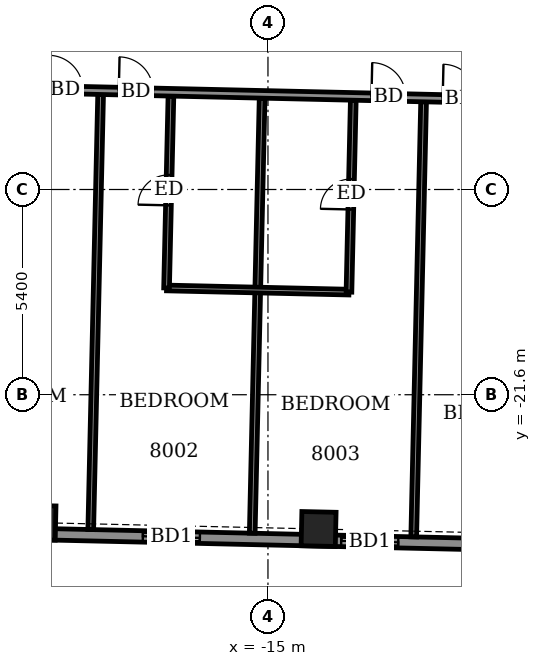
"""IFC4 building model, lengths in metres.
Left out: names, types, materials, properties, quantities, classifications, styles, units other than length and angle.
Written with IfcOpenShell. Run it as: python <this file> out.ifc"""

import sys

from ifc_helpers import new_model, si_unit, direction, frame, frame_2d, origin, origin_2d, place, context, subcontext, project, spatial, rectangle, extrude, element, fill, save


model = new_model("IFC4")
c1 = context("Model", 3, precision=1e-05, world=origin(), true_north=direction((0.0, 1.0)))
c2 = subcontext(c1, "Body", "Model", "MODEL_VIEW")
j1 = project(units=[si_unit("LENGTHUNIT", "METRE"), si_unit("PLANEANGLEUNIT", "RADIAN")], contexts=[c1])
p1 = place(None, origin())
s1 = spatial("IfcSite", under=j1, at=p1, CompositionType="ELEMENT")
p2 = place(p1, origin())
s2 = spatial("IfcBuilding", under=s1, at=p2, CompositionType="ELEMENT")
p3 = place(p2, frame((0.0, 0.0, 313.3)))
s3 = spatial("IfcBuildingStorey", under=s2, at=p3, CompositionType="ELEMENT", Elevation=313.3)
for number, where, z_axis, x_axis in (
    (1, (-21.038, -24.966, -0.55), (0.0, 0.0, 1.0), (1.0, -0.023, 0.0)),
    (2, (-13.668, -25.133, -0.55), (0.0, 0.0, 1.0), (1.0, -0.023, 0.0)),
):
    element("IfcColumn", number, at=place(p3, frame(where, z_axis=z_axis, x_axis=x_axis)), inside=s3, PredefinedType="COLUMN", context=c2, shape_type="SweptSolid", body=[
        extrude(rectangle(XDim=0.9, YDim=0.9, at=origin_2d()), origin(), (0.0, 0.0, 1.0), 3.6),
    ])
p4 = place(p3, frame((-28.264, -25.102, 0.0), z_axis=(0.0, 0.0, 1.0), x_axis=(0.999742520573, -0.022691244094, 0.0)))
e3 = element("IfcWall", 3, at=p4, inside=s3, PredefinedType="SOLIDWALL", context=c2, shape_type="SweptSolid", body=[
    extrude(rectangle(XDim=51.3, YDim=0.3, at=frame_2d((25.65, 0.0))), origin(), (0.0, 0.0, 1.0), 2.5),
])
p5 = place(p4, frame((1.654, 0.0, 0.0)))
e4 = element("IfcOpeningElement", 4, at=p5, cuts=e3, PredefinedType="OPENING", context=c2, shape_type="SweptSolid", body=[
    extrude(rectangle(XDim=1.5, YDim=2.4, at=frame_2d((0.75, 1.2))), frame((0.0, 0.16, 0.0), z_axis=(0.0, -1.0, 0.0), x_axis=(1.0, 0.0, 0.0)), (0.0, 0.0, 1.0), 0.32),
])
p6 = place(p4, frame((4.936, 0.0, 0.0)))
e5 = element("IfcOpeningElement", 5, at=p6, cuts=e3, PredefinedType="OPENING", context=c2, shape_type="SweptSolid", body=[
    extrude(rectangle(XDim=1.5, YDim=2.4, at=frame_2d((0.75, 1.2))), frame((0.0, 0.16, 0.0), z_axis=(0.0, -1.0, 0.0), x_axis=(1.0, 0.0, 0.0)), (0.0, 0.0, 1.0), 0.32),
])
p7 = place(p4, frame((9.975, 0.0, 0.0)))
e6 = element("IfcOpeningElement", 6, at=p7, cuts=e3, PredefinedType="OPENING", context=c2, shape_type="SweptSolid", body=[
    extrude(rectangle(XDim=1.5, YDim=2.4, at=frame_2d((0.75, 1.2))), frame((0.0, 0.16, 0.0), z_axis=(0.0, -1.0, 0.0), x_axis=(1.0, 0.0, 0.0)), (0.0, 0.0, 1.0), 0.32),
])
p8 = place(p4, frame((15.196, 0.0, 0.0)))
e7 = element("IfcOpeningElement", 7, at=p8, cuts=e3, PredefinedType="OPENING", context=c2, shape_type="SweptSolid", body=[
    extrude(rectangle(XDim=1.5, YDim=2.4, at=frame_2d((0.75, 1.2))), frame((0.0, 0.16, 0.0), z_axis=(0.0, -1.0, 0.0), x_axis=(1.0, 0.0, 0.0)), (0.0, 0.0, 1.0), 0.32),
])
p9 = place(p4, frame((18.5, 0.0, 0.0)))
e8 = element("IfcOpeningElement", 8, at=p9, cuts=e3, PredefinedType="OPENING", context=c2, shape_type="SweptSolid", body=[
    extrude(rectangle(XDim=1.5, YDim=2.4, at=frame_2d((0.75, 1.2))), frame((0.0, 0.16, 0.0), z_axis=(0.0, -1.0, 0.0), x_axis=(1.0, 0.0, 0.0)), (0.0, 0.0, 1.0), 0.32),
])
p10 = place(p4, frame((23.157, 0.0, 0.0)))
e9 = element("IfcOpeningElement", 9, at=p10, cuts=e3, PredefinedType="OPENING", context=c2, shape_type="SweptSolid", body=[
    extrude(rectangle(XDim=1.5, YDim=2.4, at=frame_2d((0.75, 1.2))), frame((0.0, 0.16, 0.0), z_axis=(0.0, -1.0, 0.0), x_axis=(1.0, 0.0, 0.0)), (0.0, 0.0, 1.0), 0.32),
])
p11 = place(p4, frame((26.643, 0.0, 0.0)))
e10 = element("IfcOpeningElement", 10, at=p11, cuts=e3, PredefinedType="OPENING", context=c2, shape_type="SweptSolid", body=[
    extrude(rectangle(XDim=1.5, YDim=2.4, at=frame_2d((0.75, 1.2))), frame((0.0, 0.16, 0.0), z_axis=(0.0, -1.0, 0.0), x_axis=(1.0, 0.0, 0.0)), (0.0, 0.0, 1.0), 0.32),
])
p12 = place(p4, frame((31.275, 0.0, 0.0)))
e11 = element("IfcOpeningElement", 11, at=p12, cuts=e3, PredefinedType="OPENING", context=c2, shape_type="SweptSolid", body=[
    extrude(rectangle(XDim=1.5, YDim=2.4, at=frame_2d((0.75, 1.2))), frame((0.0, 0.16, 0.0), z_axis=(0.0, -1.0, 0.0), x_axis=(1.0, 0.0, 0.0)), (0.0, 0.0, 1.0), 0.32),
])
p13 = place(p4, frame((34.578, 0.0, 0.0)))
e12 = element("IfcOpeningElement", 12, at=p13, cuts=e3, PredefinedType="OPENING", context=c2, shape_type="SweptSolid", body=[
    extrude(rectangle(XDim=1.5, YDim=2.4, at=frame_2d((0.75, 1.2))), frame((0.0, 0.16, 0.0), z_axis=(0.0, -1.0, 0.0), x_axis=(1.0, 0.0, 0.0)), (0.0, 0.0, 1.0), 0.32),
])
p14 = place(p4, frame((39.75, 0.0, 0.0)))
e13 = element("IfcOpeningElement", 13, at=p14, cuts=e3, PredefinedType="OPENING", context=c2, shape_type="SweptSolid", body=[
    extrude(rectangle(XDim=1.5, YDim=2.4, at=frame_2d((0.75, 1.2))), frame((0.0, 0.16, 0.0), z_axis=(0.0, -1.0, 0.0), x_axis=(1.0, 0.0, 0.0)), (0.0, 0.0, 1.0), 0.32),
])
p15 = place(p4, frame((44.839, 0.0, 0.0)))
e14 = element("IfcOpeningElement", 14, at=p15, cuts=e3, PredefinedType="OPENING", context=c2, shape_type="SweptSolid", body=[
    extrude(rectangle(XDim=1.5, YDim=2.4, at=frame_2d((0.75, 1.2))), frame((0.0, 0.16, 0.0), z_axis=(0.0, -1.0, 0.0), x_axis=(1.0, 0.0, 0.0)), (0.0, 0.0, 1.0), 0.32),
])
p16 = place(p4, frame((47.628, 0.0, 0.9)))
e15 = element("IfcOpeningElement", 15, at=p16, cuts=e3, PredefinedType="OPENING", context=c2, shape_type="SweptSolid", body=[
    extrude(rectangle(XDim=2.4, YDim=1.5, at=frame_2d((1.2, 0.75))), frame((0.0, 0.16, 0.0), z_axis=(0.0, -1.0, 0.0), x_axis=(1.0, 0.0, 0.0)), (0.0, 0.0, 1.0), 0.32),
])
p17 = place(p3, frame((-19.663, -25.147, 0.0), z_axis=(0.0, 0.0, 1.0), x_axis=(0.022708327922, 0.999742132674, 0.0)))
e16 = element("IfcWall", 16, at=p17, inside=s3, PredefinedType="PARTITIONING", context=c2, shape_type="SweptSolid", body=[
    extrude(rectangle(XDim=11.45, YDim=0.15, at=frame_2d((5.725, 0.0))), origin(), (0.0, 0.0, 1.0), 2.5),
])
p18 = place(p3, frame((-15.414, -25.244, 0.0), z_axis=(0.0, 0.0, 1.0), x_axis=(0.022706391805, 0.999742176649, 0.0)))
e17 = element("IfcWall", 17, at=p18, inside=s3, PredefinedType="PARTITIONING", context=c2, shape_type="SweptSolid", body=[
    extrude(rectangle(XDim=11.451, YDim=0.15, at=frame_2d((5.726, 0.0))), origin(), (0.0, 0.0, 1.0), 2.5),
])
p19 = place(p3, frame((-11.165, -25.34, 0.0), z_axis=(0.0, 0.0, 1.0), x_axis=(0.022708327922, 0.999742132674, 0.0)))
e18 = element("IfcWall", 18, at=p19, inside=s3, PredefinedType="PARTITIONING", context=c2, shape_type="SweptSolid", body=[
    extrude(rectangle(XDim=11.45, YDim=0.15, at=frame_2d((5.725, 0.0))), origin(), (0.0, 0.0, 1.0), 2.5),
])
p20 = place(p3, frame((-17.668, -18.791, 0.0), z_axis=(0.0, 0.0, 1.0), x_axis=(0.999742701292, -0.022683280499, 0.0)))
e19 = element("IfcWall", 19, at=p20, inside=s3, PredefinedType="PARTITIONING", context=c2, shape_type="SweptSolid", body=[
    extrude(rectangle(XDim=4.8, YDim=0.15, at=frame_2d((2.4, 0.0))), origin(), (0.0, 0.0, 1.0), 3.05),
])
p21 = place(p3, frame((-17.668, -18.791, 0.0), z_axis=(0.0, 0.0, 1.0), x_axis=(0.022768623305, 0.999740761294, 0.0)))
e20 = element("IfcWall", 20, at=p21, inside=s3, PredefinedType="PARTITIONING", context=c2, shape_type="SweptSolid", body=[
    extrude(rectangle(XDim=5.05, YDim=0.15, at=frame_2d((2.525, 0.0))), origin(), (0.0, 0.0, 1.0), 3.05),
])
p22 = place(p21, frame((2.175, 0.0, 0.0)))
e21 = element("IfcOpeningElement", 21, at=p22, cuts=e20, PredefinedType="OPENING", context=c2, shape_type="SweptSolid", body=[
    extrude(rectangle(XDim=0.8, YDim=2.1, at=frame_2d((0.4, 1.05))), frame((0.0, 0.085, 0.0), z_axis=(0.0, -1.0, 0.0), x_axis=(1.0, 0.0, 0.0)), (0.0, 0.0, 1.0), 0.17),
])
p23 = place(p3, frame((-12.869, -18.9, 0.0), z_axis=(0.0, 0.0, 1.0), x_axis=(0.022576449265, 0.999745119487, 0.0)))
e22 = element("IfcWall", 22, at=p23, inside=s3, PredefinedType="PARTITIONING", context=c2, shape_type="SweptSolid", body=[
    extrude(rectangle(XDim=5.05, YDim=0.15, at=frame_2d((2.525, 0.0))), origin(), (0.0, 0.0, 1.0), 3.05),
])
p24 = place(p23, frame((2.175, 0.0, 0.0)))
e23 = element("IfcOpeningElement", 23, at=p24, cuts=e22, PredefinedType="OPENING", context=c2, shape_type="SweptSolid", body=[
    extrude(rectangle(XDim=0.8, YDim=2.1, at=frame_2d((0.4, 1.05))), frame((0.0, 0.085, 0.0), z_axis=(0.0, -1.0, 0.0), x_axis=(1.0, 0.0, 0.0)), (0.0, 0.0, 1.0), 0.17),
])
p25 = place(p3, frame((-31.347, -13.329, 0.0), z_axis=(0.0, 0.0, 1.0), x_axis=(0.999742613079, -0.022687168058, 0.0)))
e24 = element("IfcWall", 24, at=p25, inside=s3, PredefinedType="PARTITIONING", context=c2, shape_type="SweptSolid", body=[
    extrude(rectangle(XDim=58.799, YDim=0.2, at=frame_2d((29.399, 0.0))), origin(), (0.0, 0.0, 1.0), 3.05),
])
p26 = place(p25, frame((1.35, 0.0, 0.0)))
e25 = element("IfcOpeningElement", 25, at=p26, cuts=e24, PredefinedType="OPENING", context=c2, shape_type="SweptSolid", body=[
    extrude(rectangle(XDim=1.0, YDim=2.1, at=frame_2d((0.5, 1.05))), frame((0.0, 0.11, 0.0), z_axis=(0.0, -1.0, 0.0), x_axis=(1.0, 0.0, 0.0)), (0.0, 0.0, 1.0), 0.22),
])
p27 = place(p25, frame((5.95, 0.0, 0.0)))
e26 = element("IfcOpeningElement", 26, at=p27, cuts=e24, PredefinedType="OPENING", context=c2, shape_type="SweptSolid", body=[
    extrude(rectangle(XDim=0.9, YDim=2.1, at=frame_2d((0.45, 1.05))), frame((0.0, 0.11, 0.0), z_axis=(0.0, -1.0, 0.0), x_axis=(1.0, 0.0, 0.0)), (0.0, 0.0, 1.0), 0.22),
])
p28 = place(p25, frame((10.575, 0.0, 0.0)))
e27 = element("IfcOpeningElement", 27, at=p28, cuts=e24, PredefinedType="OPENING", context=c2, shape_type="SweptSolid", body=[
    extrude(rectangle(XDim=0.9, YDim=2.1, at=frame_2d((0.45, 1.05))), frame((0.0, 0.11, 0.0), z_axis=(0.0, -1.0, 0.0), x_axis=(1.0, 0.0, 0.0)), (0.0, 0.0, 1.0), 0.22),
])
p29 = place(p25, frame((12.425, 0.0, 0.0)))
e28 = element("IfcOpeningElement", 28, at=p29, cuts=e24, PredefinedType="OPENING", context=c2, shape_type="SweptSolid", body=[
    extrude(rectangle(XDim=0.9, YDim=2.1, at=frame_2d((0.45, 1.05))), frame((0.0, 0.11, 0.0), z_axis=(0.0, -1.0, 0.0), x_axis=(1.0, 0.0, 0.0)), (0.0, 0.0, 1.0), 0.22),
])
p30 = place(p25, frame((19.075, 0.0, 0.0)))
e29 = element("IfcOpeningElement", 29, at=p30, cuts=e24, PredefinedType="OPENING", context=c2, shape_type="SweptSolid", body=[
    extrude(rectangle(XDim=0.9, YDim=2.1, at=frame_2d((0.45, 1.05))), frame((0.0, 0.11, 0.0), z_axis=(0.0, -1.0, 0.0), x_axis=(1.0, 0.0, 0.0)), (0.0, 0.0, 1.0), 0.22),
])
p31 = place(p25, frame((20.95, 0.0, 0.0)))
e30 = element("IfcOpeningElement", 30, at=p31, cuts=e24, PredefinedType="OPENING", context=c2, shape_type="SweptSolid", body=[
    extrude(rectangle(XDim=0.9, YDim=2.1, at=frame_2d((0.45, 1.05))), frame((0.0, 0.11, 0.0), z_axis=(0.0, -1.0, 0.0), x_axis=(1.0, 0.0, 0.0)), (0.0, 0.0, 1.0), 0.22),
])
p32 = place(p25, frame((27.625, 0.0, 0.0)))
e31 = element("IfcOpeningElement", 31, at=p32, cuts=e24, PredefinedType="OPENING", context=c2, shape_type="SweptSolid", body=[
    extrude(rectangle(XDim=0.9, YDim=2.1, at=frame_2d((0.45, 1.05))), frame((0.0, 0.11, 0.0), z_axis=(0.0, -1.0, 0.0), x_axis=(1.0, 0.0, 0.0)), (0.0, 0.0, 1.0), 0.22),
])
p33 = place(p25, frame((29.475, 0.0, 0.0)))
e32 = element("IfcOpeningElement", 32, at=p33, cuts=e24, PredefinedType="OPENING", context=c2, shape_type="SweptSolid", body=[
    extrude(rectangle(XDim=0.9, YDim=2.1, at=frame_2d((0.45, 1.05))), frame((0.0, 0.11, 0.0), z_axis=(0.0, -1.0, 0.0), x_axis=(1.0, 0.0, 0.0)), (0.0, 0.0, 1.0), 0.22),
])
p34 = place(p25, frame((36.125, 0.0, 0.0)))
e33 = element("IfcOpeningElement", 33, at=p34, cuts=e24, PredefinedType="OPENING", context=c2, shape_type="SweptSolid", body=[
    extrude(rectangle(XDim=0.9, YDim=2.1, at=frame_2d((0.45, 1.05))), frame((0.0, 0.11, 0.0), z_axis=(0.0, -1.0, 0.0), x_axis=(1.0, 0.0, 0.0)), (0.0, 0.0, 1.0), 0.22),
])
p35 = place(p25, frame((37.95, 0.0, 0.0)))
e34 = element("IfcOpeningElement", 34, at=p35, cuts=e24, PredefinedType="OPENING", context=c2, shape_type="SweptSolid", body=[
    extrude(rectangle(XDim=0.9, YDim=2.1, at=frame_2d((0.45, 1.05))), frame((0.0, 0.11, 0.0), z_axis=(0.0, -1.0, 0.0), x_axis=(1.0, 0.0, 0.0)), (0.0, 0.0, 1.0), 0.22),
])
p36 = place(p25, frame((44.6, 0.0, 0.0)))
e35 = element("IfcOpeningElement", 35, at=p36, cuts=e24, PredefinedType="OPENING", context=c2, shape_type="SweptSolid", body=[
    extrude(rectangle(XDim=0.9, YDim=2.1, at=frame_2d((0.45, 1.05))), frame((0.0, 0.11, 0.0), z_axis=(0.0, -1.0, 0.0), x_axis=(1.0, 0.0, 0.0)), (0.0, 0.0, 1.0), 0.22),
])
p37 = place(p25, frame((46.475, 0.0, 0.0)))
e36 = element("IfcOpeningElement", 36, at=p37, cuts=e24, PredefinedType="OPENING", context=c2, shape_type="SweptSolid", body=[
    extrude(rectangle(XDim=0.9, YDim=2.1, at=frame_2d((0.45, 1.05))), frame((0.0, 0.11, 0.0), z_axis=(0.0, -1.0, 0.0), x_axis=(1.0, 0.0, 0.0)), (0.0, 0.0, 1.0), 0.22),
])
p38 = place(p25, frame((55.925, 0.0, 0.0)))
e37 = element("IfcOpeningElement", 37, at=p38, cuts=e24, PredefinedType="OPENING", context=c2, shape_type="SweptSolid", body=[
    extrude(rectangle(XDim=1.0, YDim=2.1, at=frame_2d((0.5, 1.05))), frame((0.0, 0.11, 0.0), z_axis=(0.0, -1.0, 0.0), x_axis=(1.0, 0.0, 0.0)), (0.0, 0.0, 1.0), 0.22),
])
p39 = place(p25, frame((51.0, 0.0, 0.0)))
e38 = element("IfcOpeningElement", 38, at=p39, cuts=e24, PredefinedType="OPENING", context=c2, shape_type="SweptSolid", body=[
    extrude(rectangle(XDim=0.9, YDim=2.1, at=frame_2d((0.45, 1.05))), frame((0.0, 0.11, 0.0), z_axis=(0.0, -1.0, 0.0), x_axis=(1.0, 0.0, 0.0)), (0.0, 0.0, 1.0), 0.22),
])
p40 = place(p7, origin())
e39 = element("IfcDoor", 39, at=p40, inside=s3, OperationType="SLIDING_TO_LEFT", PredefinedType="DOOR", context=c2, shape_type="SweptSolid", body=[
    extrude(rectangle(XDim=1.5, YDim=2.4, at=frame_2d((0.75, 1.2))), frame((0.0, 0.025, 0.0), z_axis=(0.0, -1.0, 0.0), x_axis=(1.0, 0.0, 0.0)), (0.0, 0.0, 1.0), 0.05),
])
fill(e6, e39)
p41 = place(p8, origin())
e40 = element("IfcDoor", 40, at=p41, inside=s3, OperationType="SLIDING_TO_LEFT", PredefinedType="DOOR", context=c2, shape_type="SweptSolid", body=[
    extrude(rectangle(XDim=1.5, YDim=2.4, at=frame_2d((0.75, 1.2))), frame((0.0, 0.025, 0.0), z_axis=(0.0, -1.0, 0.0), x_axis=(1.0, 0.0, 0.0)), (0.0, 0.0, 1.0), 0.05),
])
fill(e7, e40)
p42 = place(p28, origin())
e41 = element("IfcDoor", 41, at=p42, inside=s3, OperationType="SINGLE_SWING_LEFT", PredefinedType="DOOR", context=c2, shape_type="SweptSolid", body=[
    extrude(rectangle(XDim=0.9, YDim=2.1, at=frame_2d((0.45, 1.05))), frame((0.0, 0.025, 0.0), z_axis=(0.0, -1.0, 0.0), x_axis=(1.0, 0.0, 0.0)), (0.0, 0.0, 1.0), 0.05),
])
fill(e27, e41)
p43 = place(p29, origin())
e42 = element("IfcDoor", 42, at=p43, inside=s3, OperationType="SINGLE_SWING_RIGHT", PredefinedType="DOOR", context=c2, shape_type="SweptSolid", body=[
    extrude(rectangle(XDim=0.9, YDim=2.1, at=frame_2d((0.45, 1.05))), frame((0.0, 0.025, 0.0), z_axis=(0.0, -1.0, 0.0), x_axis=(1.0, 0.0, 0.0)), (0.0, 0.0, 1.0), 0.05),
])
fill(e28, e42)
p44 = place(p22, origin())
e43 = element("IfcDoor", 43, at=p44, inside=s3, OperationType="SINGLE_SWING_RIGHT", PredefinedType="DOOR", context=c2, shape_type="SweptSolid", body=[
    extrude(rectangle(XDim=0.8, YDim=2.1, at=frame_2d((0.4, 1.05))), frame((0.0, 0.025, 0.0), z_axis=(0.0, -1.0, 0.0), x_axis=(1.0, 0.0, 0.0)), (0.0, 0.0, 1.0), 0.05),
])
fill(e21, e43)
p45 = place(p30, origin())
e44 = element("IfcDoor", 44, at=p45, inside=s3, OperationType="SINGLE_SWING_LEFT", PredefinedType="DOOR", context=c2, shape_type="SweptSolid", body=[
    extrude(rectangle(XDim=0.9, YDim=2.1, at=frame_2d((0.45, 1.05))), frame((0.0, 0.025, 0.0), z_axis=(0.0, -1.0, 0.0), x_axis=(1.0, 0.0, 0.0)), (0.0, 0.0, 1.0), 0.05),
])
fill(e29, e44)
p46 = place(p24, origin())
e45 = element("IfcDoor", 45, at=p46, inside=s3, OperationType="SINGLE_SWING_LEFT", PredefinedType="DOOR", context=c2, shape_type="SweptSolid", body=[
    extrude(rectangle(XDim=0.8, YDim=2.1, at=frame_2d((0.4, 1.05))), frame((0.0, 0.025, 0.0), z_axis=(0.0, -1.0, 0.0), x_axis=(1.0, 0.0, 0.0)), (0.0, 0.0, 1.0), 0.05),
])
fill(e23, e45)
p47 = place(p31, origin())
e46 = element("IfcDoor", 46, at=p47, inside=s3, OperationType="SINGLE_SWING_RIGHT", PredefinedType="DOOR", context=c2, shape_type="SweptSolid", body=[
    extrude(rectangle(XDim=0.9, YDim=2.1, at=frame_2d((0.45, 1.05))), frame((0.0, 0.025, 0.0), z_axis=(0.0, -1.0, 0.0), x_axis=(1.0, 0.0, 0.0)), (0.0, 0.0, 1.0), 0.05),
])
fill(e30, e46)
save(model, sys.argv[1])
